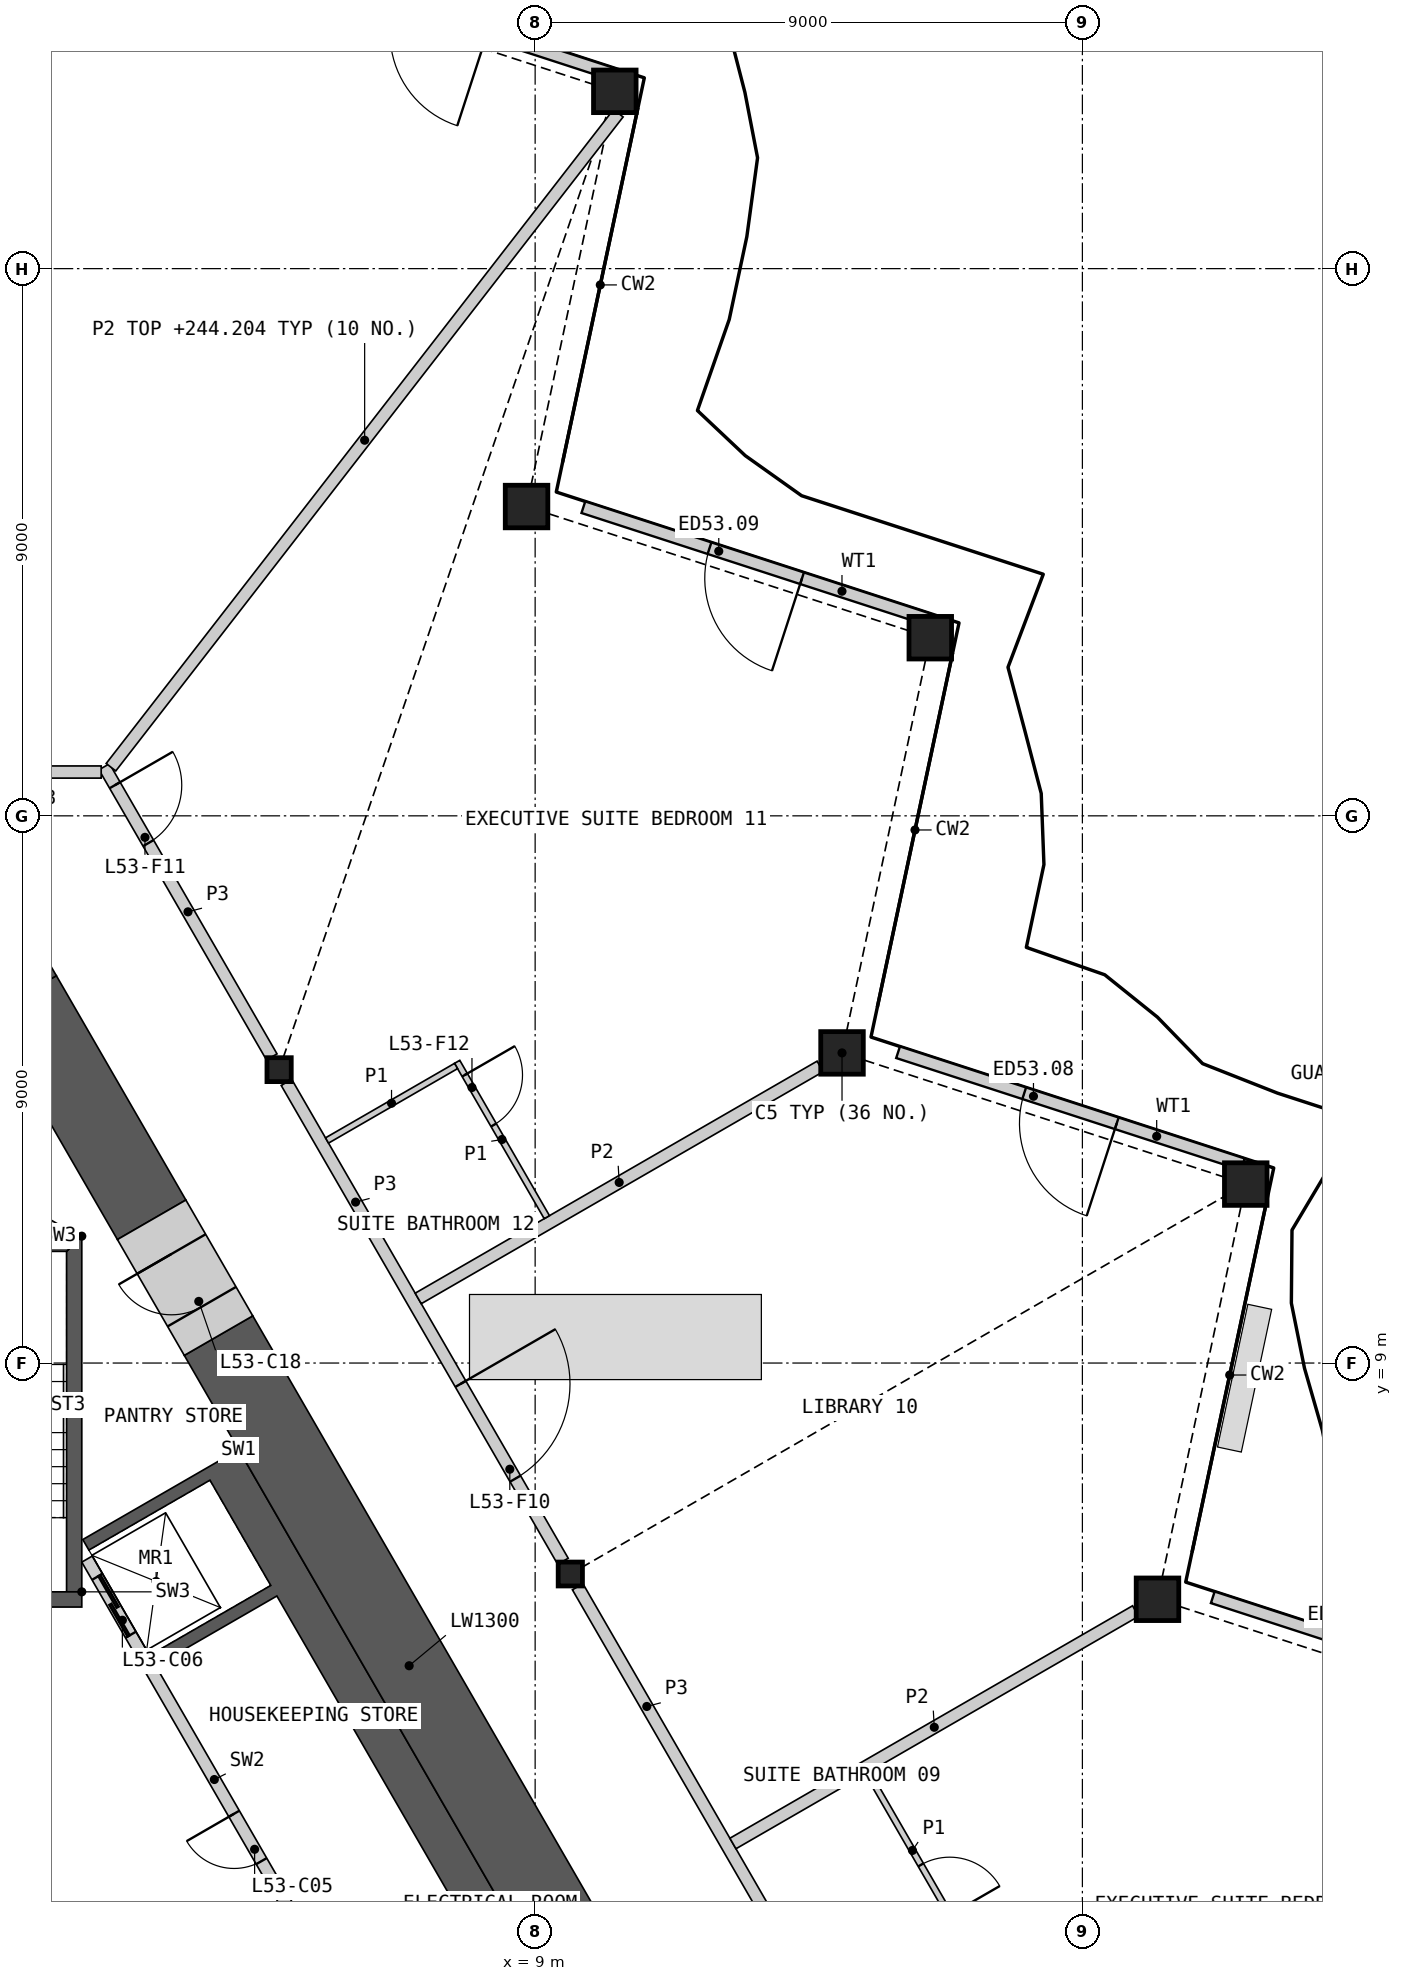
"""IFC4 building model, lengths in metres.
Left out: names, types, materials, properties, quantities, classifications, styles, units other than length and angle.
Written with IfcOpenShell. Run it as: python <this file> out.ifc"""

import sys

from ifc_helpers import new_model, si_unit, direction, frame, frame_2d, origin, origin_2d, place, context, subcontext, project, spatial, polyline, rectangle, hollow_rectangle, i_section, outline, extrude, element, fill, save


model = new_model("IFC4")
c1 = context("Model", 3, precision=1e-05, world=origin(), true_north=direction((0.0, 1.0)))
c2 = subcontext(c1, "Body", "Model", "MODEL_VIEW")
j1 = project(units=[si_unit("LENGTHUNIT", "METRE"), si_unit("PLANEANGLEUNIT", "RADIAN")], contexts=[c1])
p1 = place(None, origin())
s1 = spatial("IfcSite", under=j1, at=p1, CompositionType="ELEMENT")
p2 = place(p1, origin())
s2 = spatial("IfcBuilding", under=s1, at=p2, CompositionType="ELEMENT")
p3 = place(p2, frame((0.0, 0.0, 241.8)))
s3 = spatial("IfcBuildingStorey", under=s2, at=p3, CompositionType="ELEMENT", Elevation=241.8)
for number, where, z_axis, x_axis in (
    (1, (19.235, 5.115, 0.0), (0.0, 0.0, 1.0), (1.0, 0.0, 0.0)),
    (2, (20.687, 11.943, 0.0), (0.0, 0.0, 1.0), (1.0, 0.0, 0.0)),
    (3, (14.047, 14.101, 0.0), (0.0, 0.0, 1.0), (1.0, 0.0, 0.0)),
    (4, (15.499, 20.93, 0.0), (0.0, 0.0, 1.0), (1.0, 0.0, 0.0)),
    (5, (8.859, 23.087, 0.0), (0.0, 0.0, 1.0), (1.0, 0.0, 0.0)),
    (6, (10.31, 29.916, 0.0), (0.0, 0.0, 1.0), (1.0, 0.0, 0.0)),
):
    element("IfcColumn", number, at=place(p3, frame(where, z_axis=z_axis, x_axis=x_axis)), inside=s3, PredefinedType="COLUMN", context=c2, shape_type="SweptSolid", body=[
        extrude(hollow_rectangle(XDim=0.7, YDim=0.7, WallThickness=0.045, at=origin_2d()), origin(), (0.0, 0.0, 1.0), 3.6),
    ])
for number, where, z_axis, x_axis in (
    (7, (9.578, 5.53, 0.0), (0.0, 0.0, 1.0), (1.0, 0.0, 0.0)),
    (8, (4.789, 13.825, 0.0), (0.0, 0.0, 1.0), (1.0, 0.0, 0.0)),
):
    element("IfcColumn", number, at=place(p3, frame(where, z_axis=z_axis, x_axis=x_axis)), inside=s3, PredefinedType="COLUMN", context=c2, shape_type="SweptSolid", body=[
        extrude(i_section(OverallWidth=0.399, OverallDepth=0.393, WebThickness=0.023, FlangeThickness=0.037, at=origin_2d()), origin(), (0.0, 0.0, 1.0), 3.6),
    ])
p4 = place(p3, frame((25.815, 3.304, 0.0), z_axis=(0.0, 0.0, 1.0), x_axis=(-0.951055430656, 0.309020335608, 0.0)))
e9 = element("IfcWall", 9, at=p4, inside=s3, PredefinedType="SOLIDWALL", context=c2, shape_type="SweptSolid", body=[
    extrude(rectangle(XDim=5.962, YDim=0.2, at=frame_2d((2.981, 0.0))), origin(), (0.0, 0.0, 1.0), 2.701),
])
p5 = place(p4, frame((2.181, 0.0, 0.0)))
e10 = element("IfcOpeningElement", 10, at=p5, cuts=e9, PredefinedType="OPENING", context=c2, shape_type="SweptSolid", body=[
    extrude(rectangle(XDim=1.6, YDim=2.4, at=frame_2d((0.8, 1.2))), frame((0.0, 0.11, 0.0), z_axis=(0.0, -1.0, 0.0), x_axis=(1.0, 0.0, 0.0)), (0.0, 0.0, 1.0), 0.22),
])
p6 = place(p3, frame((20.64, 12.269, 0.0), z_axis=(0.0, 0.0, 1.0), x_axis=(-0.95104730696, 0.309045336358, 0.0)))
e11 = element("IfcWall", 11, at=p6, inside=s3, PredefinedType="SOLIDWALL", context=c2, shape_type="SweptSolid", body=[
    extrude(rectangle(XDim=5.963, YDim=0.2, at=frame_2d((2.981, 0.0))), origin(), (0.0, 0.0, 1.0), 2.701),
])
p7 = place(p6, frame((2.181, 0.0, 0.0)))
e12 = element("IfcOpeningElement", 12, at=p7, cuts=e11, PredefinedType="OPENING", context=c2, shape_type="SweptSolid", body=[
    extrude(rectangle(XDim=1.6, YDim=2.4, at=frame_2d((0.8, 1.2))), frame((0.0, 0.11, 0.0), z_axis=(0.0, -1.0, 0.0), x_axis=(1.0, 0.0, 0.0)), (0.0, 0.0, 1.0), 0.22),
])
p8 = place(p3, frame((15.464, 21.233, 0.0), z_axis=(0.0, 0.0, 1.0), x_axis=(-0.951055430656, 0.309020335608, 0.0)))
e13 = element("IfcWall", 13, at=p8, inside=s3, PredefinedType="SOLIDWALL", context=c2, shape_type="SweptSolid", body=[
    extrude(rectangle(XDim=5.962, YDim=0.2, at=frame_2d((2.981, 0.0))), origin(), (0.0, 0.0, 1.0), 2.701),
])
p9 = place(p8, frame((2.181, 0.0, 0.0)))
e14 = element("IfcOpeningElement", 14, at=p9, cuts=e13, PredefinedType="OPENING", context=c2, shape_type="SweptSolid", body=[
    extrude(rectangle(XDim=1.6, YDim=2.4, at=frame_2d((0.8, 1.2))), frame((0.0, 0.11, 0.0), z_axis=(0.0, -1.0, 0.0), x_axis=(1.0, 0.0, 0.0)), (0.0, 0.0, 1.0), 0.22),
])
p10 = place(p3, frame((10.288, 30.198, 0.0), z_axis=(0.0, 0.0, 1.0), x_axis=(-0.951055430656, 0.309020335608, 0.0)))
e15 = element("IfcWall", 15, at=p10, inside=s3, PredefinedType="SOLIDWALL", context=c2, shape_type="SweptSolid", body=[
    extrude(rectangle(XDim=5.962, YDim=0.2, at=frame_2d((2.981, 0.0))), origin(), (0.0, 0.0, 1.0), 2.701),
])
p11 = place(p10, frame((2.181, 0.0, 0.0)))
e16 = element("IfcOpeningElement", 16, at=p11, cuts=e15, PredefinedType="OPENING", context=c2, shape_type="SweptSolid", body=[
    extrude(rectangle(XDim=1.6, YDim=2.4, at=frame_2d((0.8, 1.2))), frame((0.0, 0.11, 0.0), z_axis=(0.0, -1.0, 0.0), x_axis=(1.0, 0.0, 0.0)), (0.0, 0.0, 1.0), 0.22),
])
p12 = place(p3, origin())
e17 = element("IfcWall", 17, at=p12, inside=s3, PredefinedType="SHEAR", context=c2, shape_type="SweptSolid", body=[
    extrude(outline(polyline([(4.124, 7.577), (8.624, -0.217), (8.231, -0.444), (6.061, -1.697), (5.96, -1.524), (7.952, -0.374), (4.752, 5.169), (2.76, 4.019), (2.66, 4.192), (4.652, 5.342), (3.652, 7.074), (1.66, 5.924), (1.561, 6.097), (3.731, 7.35), (4.124, 7.577)])), origin(), (0.0, 0.0, 1.0), 3.25),
])
p13 = place(p3, frame((5.817, -1.476, 0.0), z_axis=(0.0, 0.0, 1.0), x_axis=(-0.500002616675, 0.866023893041, 0.0)))
e18 = element("IfcWall", 18, at=p13, inside=s3, PredefinedType="SOLIDWALL", context=c2, shape_type="SweptSolid", body=[
    extrude(rectangle(XDim=8.373, YDim=0.2, at=frame_2d((4.187, 0.0))), origin(), (0.0, 0.0, 1.0), 3.25),
])
p14 = place(p13, frame((2.637, 0.0, 0.0)))
e19 = element("IfcOpeningElement", 19, at=p14, cuts=e18, PredefinedType="OPENING", context=c2, shape_type="SweptSolid", body=[
    extrude(rectangle(XDim=0.9, YDim=2.1, at=frame_2d((0.45, 1.05))), frame((0.0, 0.11, 0.0), z_axis=(0.0, -1.0, 0.0), x_axis=(1.0, 0.0, 0.0)), (0.0, 0.0, 1.0), 0.22),
])
p15 = place(p13, frame((6.937, 0.0, 0.0)))
e20 = element("IfcOpeningElement", 20, at=p15, cuts=e18, PredefinedType="OPENING", context=c2, shape_type="SweptSolid", body=[
    extrude(rectangle(XDim=1.1, YDim=2.1, at=frame_2d((0.55, 1.05))), frame((0.0, 0.11, 0.0), z_axis=(0.0, -1.0, 0.0), x_axis=(1.0, 0.0, 0.0)), (0.0, 0.0, 1.0), 0.22),
])
p16 = place(p3, origin())
e21 = element("IfcWall", 21, at=p16, inside=s3, PredefinedType="SHEAR", context=c2, shape_type="SweptSolid", body=[
    extrude(outline(polyline([(1.544, 5.237), (1.544, 11.087), (1.294, 10.837), (1.294, 5.237), (1.544, 5.237)])), origin(), (0.0, 0.0, 1.0), 3.25),
])
p17 = place(p3, origin())
e22 = element("IfcWall", 22, at=p17, inside=s3, PredefinedType="SHEAR", context=c2, shape_type="SweptSolid", body=[
    extrude(outline(polyline([(1.544, 11.087), (-1.544, 11.087), (-1.294, 10.837), (1.294, 10.837), (1.544, 11.087)])), origin(), (0.0, 0.0, 1.0), 3.25),
])
p18 = place(p3, frame((1.544, 5.112, 0.0), z_axis=(0.0, 0.0, 1.0), x_axis=(-1.0, 0.0, 0.0)))
e23 = element("IfcWall", 23, at=p18, inside=s3, PredefinedType="SHEAR", context=c2, shape_type="SweptSolid", body=[
    extrude(rectangle(XDim=3.088, YDim=0.25, at=frame_2d((1.544, 0.0))), origin(), (0.0, 0.0, 1.0), 3.25),
])
p19 = place(p18, frame((0.994, 0.0, 0.0)))
e24 = element("IfcOpeningElement", 24, at=p19, cuts=e23, PredefinedType="OPENING", context=c2, shape_type="SweptSolid", body=[
    extrude(rectangle(XDim=1.1, YDim=2.1, at=frame_2d((0.55, 1.05))), frame((0.0, 0.135, 0.0), z_axis=(0.0, -1.0, 0.0), x_axis=(1.0, 0.0, 0.0)), (0.0, 0.0, 1.0), 0.27),
])
p20 = place(p3, frame((-1.237, 12.578, 0.0), z_axis=(0.0, 0.0, 1.0), x_axis=(0.866045649925, -0.499964931016, 0.0)))
e25 = element("IfcWall", 25, at=p20, inside=s3, PredefinedType="PARTITIONING", context=c2, shape_type="SweptSolid", body=[
    extrude(rectangle(XDim=2.992, YDim=0.15, at=frame_2d((1.496, 0.0))), origin(), (0.0, 0.0, 1.0), 3.25),
])
p21 = place(p3, frame((10.062, -1.408, 0.0), z_axis=(0.0, 0.0, 1.0), x_axis=(-0.500000545805, 0.866025088663, 0.0)))
e26 = element("IfcWall", 26, at=p21, inside=s3, PredefinedType="SHEAR", context=c2, shape_type="SweptSolid", body=[
    extrude(rectangle(XDim=12.539, YDim=1.3, at=frame_2d((6.27, 0.0))), origin(), (0.0, 0.0, 1.0), 3.25),
])
p22 = place(p3, frame((2.693, 11.356, 0.0), z_axis=(0.0, 0.0, 1.0), x_axis=(-0.50002837164, 0.866009022791, 0.0)))
e27 = element("IfcWall", 27, at=p22, inside=s3, PredefinedType="SHEAR", context=c2, shape_type="SweptSolid", body=[
    extrude(rectangle(XDim=4.26, YDim=1.3, at=frame_2d((2.13, 0.0))), origin(), (0.0, 0.0, 1.0), 3.25),
])
p23 = place(p3, origin())
e28 = element("IfcWall", 28, at=p23, inside=s3, PredefinedType="SHEAR", context=c2, shape_type="SweptSolid", body=[
    extrude(outline(polyline([(-1.126, 15.371), (0.0, 17.321), (1.126, 15.371), (0.0, 14.72), (-1.126, 15.371)])), origin(), (0.0, 0.0, 1.0), 3.25),
])
p24 = place(p3, frame((3.793, 9.451, 0.0), z_axis=(0.0, 0.0, 1.0), x_axis=(-0.499946605688, 0.86605622881, 0.0)))
e29 = element("IfcWall", 29, at=p24, inside=s3, PredefinedType="SHEAR", context=c2, shape_type="SweptSolid", body=[
    extrude(rectangle(XDim=2.2, YDim=1.3, at=frame_2d((1.1, 0.0))), origin(), (0.0, 0.0, 1.0), 3.25),
])
p25 = place(p24, frame((0.55, 0.0, 0.0)))
e30 = element("IfcOpeningElement", 30, at=p25, cuts=e29, PredefinedType="OPENING", context=c2, shape_type="SweptSolid", body=[
    extrude(rectangle(XDim=1.0, YDim=2.1, at=frame_2d((0.5, 1.05))), frame((0.0, 0.66, 0.0), z_axis=(0.0, -1.0, 0.0), x_axis=(1.0, 0.0, 0.0)), (0.0, 0.0, 1.0), 1.32),
])
p26 = place(p3, frame((9.699, 5.321, 0.0), z_axis=(0.0, 0.0, 1.0), x_axis=(0.49998193945, -0.866035830797, 0.0)))
e31 = element("IfcWall", 31, at=p26, inside=s3, PredefinedType="PARTITIONING", context=c2, shape_type="SweptSolid", body=[
    extrude(rectangle(XDim=9.094, YDim=0.2, at=frame_2d((4.547, 0.0))), origin(), (0.0, 0.0, 1.0), 3.25),
])
p27 = place(p3, frame((4.91, 13.616, 0.0), z_axis=(0.0, 0.0, 1.0), x_axis=(0.50000207303, -0.866024206917, 0.0)))
e32 = element("IfcWall", 32, at=p27, inside=s3, PredefinedType="PARTITIONING", context=c2, shape_type="SweptSolid", body=[
    extrude(rectangle(XDim=9.095, YDim=0.2, at=frame_2d((4.547, 0.0))), origin(), (0.0, 0.0, 1.0), 3.25),
])
p28 = place(p27, frame((5.726, 0.0, 0.0)))
e33 = element("IfcOpeningElement", 33, at=p28, cuts=e32, PredefinedType="OPENING", context=c2, shape_type="SweptSolid", body=[
    extrude(rectangle(XDim=1.8, YDim=2.1, at=frame_2d((0.9, 1.05))), frame((0.0, 0.11, 0.0), z_axis=(0.0, -1.0, 0.0), x_axis=(1.0, 0.0, 0.0)), (0.0, 0.0, 1.0), 0.22),
])
p29 = place(p3, frame((1.913, 18.807, 0.0), z_axis=(0.0, 0.0, 1.0), x_axis=(0.499984524817, -0.866034338201, 0.0)))
e34 = element("IfcWall", 34, at=p29, inside=s3, PredefinedType="PARTITIONING", context=c2, shape_type="SweptSolid", body=[
    extrude(rectangle(XDim=5.51, YDim=0.2, at=frame_2d((2.755, 0.0))), origin(), (0.0, 0.0, 1.0), 3.25),
])
p30 = place(p29, frame((0.35, 0.0, 0.0)))
e35 = element("IfcOpeningElement", 35, at=p30, cuts=e34, PredefinedType="OPENING", context=c2, shape_type="SweptSolid", body=[
    extrude(rectangle(XDim=1.1, YDim=2.1, at=frame_2d((0.55, 1.05))), frame((0.0, 0.11, 0.0), z_axis=(0.0, -1.0, 0.0), x_axis=(1.0, 0.0, 0.0)), (0.0, 0.0, 1.0), 0.22),
])
p31 = place(p3, frame((-1.863, 18.72, 0.0), z_axis=(0.0, 0.0, 1.0), x_axis=(1.0, 0.0, 0.0)))
e36 = element("IfcWall", 36, at=p31, inside=s3, PredefinedType="PARTITIONING", context=c2, shape_type="SweptSolid", body=[
    extrude(rectangle(XDim=3.726, YDim=0.2, at=frame_2d((1.863, 0.0))), origin(), (0.0, 0.0, 1.0), 3.25),
])
p32 = place(p31, frame((0.963, 0.0, 0.0)))
e37 = element("IfcOpeningElement", 37, at=p32, cuts=e36, PredefinedType="OPENING", context=c2, shape_type="SweptSolid", body=[
    extrude(rectangle(XDim=1.8, YDim=2.1, at=frame_2d((0.9, 1.05))), frame((0.0, 0.11, 0.0), z_axis=(0.0, -1.0, 0.0), x_axis=(1.0, 0.0, 0.0)), (0.0, 0.0, 1.0), 0.22),
])
p33 = place(p3, frame((2.024, 18.8, 0.0), z_axis=(0.0, 0.0, 1.0), x_axis=(0.612908308889, 0.790154038713, 0.0)))
e38 = element("IfcWall", 38, at=p33, inside=s3, PredefinedType="PARTITIONING", context=c2, shape_type="SweptSolid", body=[
    extrude(rectangle(XDim=13.613, YDim=0.2, at=frame_2d((6.807, 0.0))), origin(), (0.0, 0.0, 1.0), 2.404),
])
p34 = place(p3, frame((12.253, 1.098, 0.0), z_axis=(0.0, 0.0, 1.0), x_axis=(0.866026077102, 0.499998833779, 0.0)))
e39 = element("IfcWall", 39, at=p34, inside=s3, PredefinedType="PARTITIONING", context=c2, shape_type="SweptSolid", body=[
    extrude(rectangle(XDim=7.646, YDim=0.2, at=frame_2d((3.823, 0.0))), origin(), (0.0, 0.0, 1.0), 2.404),
])
p35 = place(p3, frame((7.077, 10.062, 0.0), z_axis=(0.0, 0.0, 1.0), x_axis=(0.866041764179, 0.499971661894, 0.0)))
e40 = element("IfcWall", 40, at=p35, inside=s3, PredefinedType="PARTITIONING", context=c2, shape_type="SweptSolid", body=[
    extrude(rectangle(XDim=7.632, YDim=0.2, at=frame_2d((3.816, 0.0))), origin(), (0.0, 0.0, 1.0), 2.404),
])
p36 = place(p3, frame((14.468, 2.261, 0.0), z_axis=(0.0, 0.0, 1.0), x_axis=(0.500037662692, -0.866003658127, 0.0)))
e41 = element("IfcWall", 41, at=p36, inside=s3, PredefinedType="PARTITIONING", context=c2, shape_type="SweptSolid", body=[
    extrude(rectangle(XDim=2.95, YDim=0.1, at=frame_2d((1.475, 0.0))), origin(), (0.0, 0.0, 1.0), 2.404),
])
p37 = place(p36, frame((1.75, 0.0, 0.0)))
e42 = element("IfcOpeningElement", 42, at=p37, cuts=e41, PredefinedType="OPENING", context=c2, shape_type="SweptSolid", body=[
    extrude(rectangle(XDim=0.95, YDim=2.1, at=frame_2d((0.475, 1.05))), frame((0.0, 0.06, 0.0), z_axis=(0.0, -1.0, 0.0), x_axis=(1.0, 0.0, 0.0)), (0.0, 0.0, 1.0), 0.12),
])
p38 = place(p3, frame((7.717, 13.954, 0.0), z_axis=(0.0, 0.0, 1.0), x_axis=(0.500001826776, -0.866024349092, 0.0)))
e43 = element("IfcWall", 43, at=p38, inside=s3, PredefinedType="PARTITIONING", context=c2, shape_type="SweptSolid", body=[
    extrude(rectangle(XDim=2.95, YDim=0.1, at=frame_2d((1.475, 0.0))), origin(), (0.0, 0.0, 1.0), 2.404),
])
p39 = place(p38, frame((0.25, 0.0, 0.0)))
e44 = element("IfcOpeningElement", 44, at=p39, cuts=e43, PredefinedType="OPENING", context=c2, shape_type="SweptSolid", body=[
    extrude(rectangle(XDim=0.95, YDim=2.1, at=frame_2d((0.475, 1.05))), frame((0.0, 0.06, 0.0), z_axis=(0.0, -1.0, 0.0), x_axis=(1.0, 0.0, 0.0)), (0.0, 0.0, 1.0), 0.12),
])
p40 = place(p3, frame((5.577, 12.66, 0.0), z_axis=(0.0, 0.0, 1.0), x_axis=(0.866014668023, 0.500018594424, 0.0)))
e45 = element("IfcWall", 45, at=p40, inside=s3, PredefinedType="PARTITIONING", context=c2, shape_type="SweptSolid", body=[
    extrude(rectangle(XDim=2.45, YDim=0.1, at=frame_2d((1.225, 0.0))), origin(), (0.0, 0.0, 1.0), 2.404),
])
p41 = place(p7, origin())
e46 = element("IfcDoor", 46, at=p41, inside=s3, OperationType="DOUBLE_DOOR_SINGLE_SWING", PredefinedType="DOOR", context=c2, shape_type="SweptSolid", body=[
    extrude(rectangle(XDim=1.6, YDim=2.4, at=frame_2d((0.8, 1.2))), frame((0.0, 0.025, 0.0), z_axis=(0.0, -1.0, 0.0), x_axis=(1.0, 0.0, 0.0)), (0.0, 0.0, 1.0), 0.05),
])
fill(e12, e46)
p42 = place(p9, origin())
e47 = element("IfcDoor", 47, at=p42, inside=s3, OperationType="DOUBLE_DOOR_SINGLE_SWING", PredefinedType="DOOR", context=c2, shape_type="SweptSolid", body=[
    extrude(rectangle(XDim=1.6, YDim=2.4, at=frame_2d((0.8, 1.2))), frame((0.0, 0.025, 0.0), z_axis=(0.0, -1.0, 0.0), x_axis=(1.0, 0.0, 0.0)), (0.0, 0.0, 1.0), 0.05),
])
fill(e14, e47)
p43 = place(p14, origin())
e48 = element("IfcDoor", 48, at=p43, inside=s3, OperationType="SINGLE_SWING_RIGHT", PredefinedType="DOOR", context=c2, shape_type="SweptSolid", body=[
    extrude(rectangle(XDim=0.9, YDim=2.1, at=frame_2d((0.45, 1.05))), frame((0.0, 0.025, 0.0), z_axis=(0.0, -1.0, 0.0), x_axis=(1.0, 0.0, 0.0)), (0.0, 0.0, 1.0), 0.05),
])
fill(e19, e48)
p44 = place(p15, origin())
e49 = element("IfcDoor", 49, at=p44, inside=s3, OperationType="SLIDING_TO_LEFT", PredefinedType="DOOR", context=c2, shape_type="SweptSolid", body=[
    extrude(rectangle(XDim=1.1, YDim=2.1, at=frame_2d((0.55, 1.05))), frame((0.0, 0.025, 0.0), z_axis=(0.0, -1.0, 0.0), x_axis=(1.0, 0.0, 0.0)), (0.0, 0.0, 1.0), 0.05),
])
fill(e20, e49)
p45 = place(p25, origin())
e50 = element("IfcDoor", 50, at=p45, inside=s3, OperationType="SINGLE_SWING_RIGHT", PredefinedType="DOOR", context=c2, shape_type="SweptSolid", body=[
    extrude(rectangle(XDim=1.0, YDim=2.1, at=frame_2d((0.5, 1.05))), frame((0.0, 0.405, 0.0), z_axis=(0.0, -1.0, 0.0), x_axis=(1.0, 0.0, 0.0)), (0.0, 0.0, 1.0), 0.05),
])
fill(e30, e50)
p46 = place(p37, origin())
e51 = element("IfcDoor", 51, at=p46, inside=s3, OperationType="SINGLE_SWING_RIGHT", PredefinedType="DOOR", context=c2, shape_type="SweptSolid", body=[
    extrude(rectangle(XDim=0.95, YDim=2.1, at=frame_2d((0.475, 1.05))), frame((0.0, 0.025, 0.0), z_axis=(0.0, -1.0, 0.0), x_axis=(1.0, 0.0, 0.0)), (0.0, 0.0, 1.0), 0.05),
])
fill(e42, e51)
p47 = place(p28, origin())
e52 = element("IfcDoor", 52, at=p47, inside=s3, OperationType="DOUBLE_DOOR_SINGLE_SWING", PredefinedType="DOOR", context=c2, shape_type="SweptSolid", body=[
    extrude(rectangle(XDim=1.8, YDim=2.1, at=frame_2d((0.9, 1.05))), frame((0.0, 0.025, 0.0), z_axis=(0.0, -1.0, 0.0), x_axis=(1.0, 0.0, 0.0)), (0.0, 0.0, 1.0), 0.05),
])
fill(e33, e52)
p48 = place(p30, origin())
e53 = element("IfcDoor", 53, at=p48, inside=s3, OperationType="SINGLE_SWING_LEFT", PredefinedType="DOOR", context=c2, shape_type="SweptSolid", body=[
    extrude(rectangle(XDim=1.1, YDim=2.1, at=frame_2d((0.55, 1.05))), frame((0.0, 0.025, 0.0), z_axis=(0.0, -1.0, 0.0), x_axis=(1.0, 0.0, 0.0)), (0.0, 0.0, 1.0), 0.05),
])
fill(e35, e53)
p49 = place(p39, origin())
e54 = element("IfcDoor", 54, at=p49, inside=s3, OperationType="SINGLE_SWING_LEFT", PredefinedType="DOOR", context=c2, shape_type="SweptSolid", body=[
    extrude(rectangle(XDim=0.95, YDim=2.1, at=frame_2d((0.475, 1.05))), frame((0.0, 0.025, 0.0), z_axis=(0.0, -1.0, 0.0), x_axis=(1.0, 0.0, 0.0)), (0.0, 0.0, 1.0), 0.05),
])
fill(e44, e54)
save(model, sys.argv[1])
